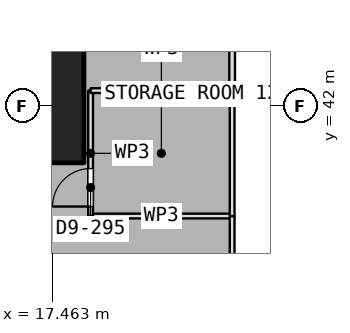
"""IFC4 building model, lengths in metres.
Left out: names, types, materials, properties, quantities, classifications, styles, units other than length and angle.
Written with IfcOpenShell. Run it as: python <this file> out.ifc"""

import sys

from ifc_helpers import new_model, si_unit, direction, frame, frame_2d, origin, origin_2d, place, context, subcontext, project, spatial, rectangle, extrude, element, fill, save


model = new_model("IFC4")
c1 = context("Model", 3, precision=1e-05, world=origin(), true_north=direction((0.0, 1.0)))
c2 = subcontext(c1, "Body", "Model", "MODEL_VIEW")
j1 = project(units=[si_unit("LENGTHUNIT", "METRE"), si_unit("PLANEANGLEUNIT", "RADIAN")], contexts=[c1])
p1 = place(None, origin())
s1 = spatial("IfcSite", under=j1, at=p1, CompositionType="ELEMENT")
p2 = place(p1, origin())
s2 = spatial("IfcBuilding", under=s1, at=p2, CompositionType="ELEMENT")
p3 = place(p2, frame((0.0, 0.0, 81.65)))
s3 = spatial("IfcBuildingStorey", under=s2, at=p3, CompositionType="ELEMENT", Elevation=81.65)
p4 = place(p3, frame((16.8, 42.0, 0.0), z_axis=(0.0, 0.0, 1.0), x_axis=(1.0, 0.0, 0.0)))
e1 = element("IfcColumn", 1, at=p4, inside=s3, PredefinedType="COLUMN", context=c2, shape_type="SweptSolid", body=[
    extrude(rectangle(XDim=3.0, YDim=3.0, at=origin_2d()), origin(), (0.0, 0.0, 1.0), 3.75),
])
p5 = place(p3, frame((18.475, 39.1, 0.0), z_axis=(0.0, 0.0, 1.0), x_axis=(1.0, 0.0, 0.0)))
e2 = element("IfcWall", 2, at=p5, inside=s3, PredefinedType="PARTITIONING", context=c2, shape_type="SweptSolid", body=[
    extrude(rectangle(XDim=3.725, YDim=0.125, at=frame_2d((1.862, 0.0))), origin(), (0.0, 0.0, 1.0), 3.4),
])
p6 = place(p3, frame((22.2, 39.1, 0.0), z_axis=(0.0, 0.0, 1.0), x_axis=(0.0, -1.0, 0.0)))
e3 = element("IfcWall", 3, at=p6, inside=s3, PredefinedType="PARTITIONING", context=c2, shape_type="SweptSolid", body=[
    extrude(rectangle(XDim=3.3, YDim=0.125, at=frame_2d((1.65, 0.0))), origin(), (0.0, 0.0, 1.0), 3.4),
])
p7 = place(p3, frame((18.475, 39.1, 0.0), z_axis=(0.0, 0.0, 1.0), x_axis=(0.0, 1.0, 0.0)))
e4 = element("IfcWall", 4, at=p7, inside=s3, PredefinedType="PARTITIONING", context=c2, shape_type="SweptSolid", body=[
    extrude(rectangle(XDim=3.3, YDim=0.125, at=frame_2d((1.65, 0.0))), origin(), (0.0, 0.0, 1.0), 3.4),
])
p8 = place(p7, frame((0.25, 0.0, 0.0)))
e5 = element("IfcOpeningElement", 5, at=p8, cuts=e4, PredefinedType="OPENING", context=c2, shape_type="SweptSolid", body=[
    extrude(rectangle(XDim=1.0, YDim=2.1, at=frame_2d((0.5, 1.05))), frame((0.0, 0.073, 0.0), z_axis=(0.0, -1.0, 0.0), x_axis=(1.0, 0.0, 0.0)), (0.0, 0.0, 1.0), 0.145),
])
p9 = place(p3, frame((18.475, 42.4, 0.0), z_axis=(0.0, 0.0, 1.0), x_axis=(1.0, 0.0, 0.0)))
e6 = element("IfcWall", 6, at=p9, inside=s3, PredefinedType="PARTITIONING", context=c2, shape_type="SweptSolid", body=[
    extrude(rectangle(XDim=3.725, YDim=0.125, at=frame_2d((1.862, 0.0))), origin(), (0.0, 0.0, 1.0), 3.4),
])
p10 = place(p3, frame((22.2, 42.4, 0.0), z_axis=(0.0, 0.0, 1.0), x_axis=(0.0, -1.0, 0.0)))
e7 = element("IfcWall", 7, at=p10, inside=s3, PredefinedType="PARTITIONING", context=c2, shape_type="SweptSolid", body=[
    extrude(rectangle(XDim=3.3, YDim=0.125, at=frame_2d((1.65, 0.0))), origin(), (0.0, 0.0, 1.0), 3.4),
])
p11 = place(p3, frame((22.2, 45.411, 0.0), z_axis=(0.0, 0.0, 1.0), x_axis=(0.0, -1.0, 0.0)))
e8 = element("IfcWall", 8, at=p11, inside=s3, PredefinedType="PARTITIONING", context=c2, shape_type="SweptSolid", body=[
    extrude(rectangle(XDim=3.011, YDim=0.15, at=frame_2d((1.505, 0.0))), origin(), (0.0, 0.0, 1.0), 3.4),
])
p12 = place(p8, origin())
e9 = element("IfcDoor", 9, at=p12, inside=s3, OperationType="SINGLE_SWING_LEFT", PredefinedType="DOOR", context=c2, shape_type="SweptSolid", body=[
    extrude(rectangle(XDim=1.0, YDim=2.1, at=frame_2d((0.5, 1.05))), frame((0.0, 0.025, 0.0), z_axis=(0.0, -1.0, 0.0), x_axis=(1.0, 0.0, 0.0)), (0.0, 0.0, 1.0), 0.05),
])
fill(e5, e9)
save(model, sys.argv[1])
